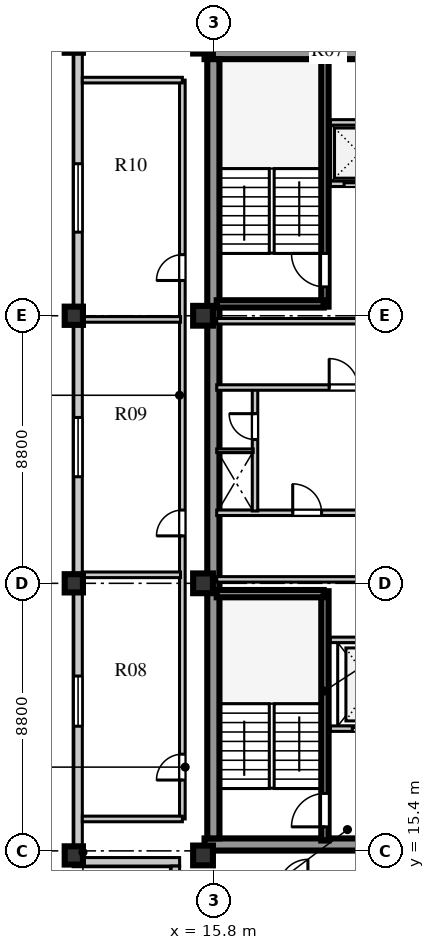
"""IFC4 building model, lengths in metres.
Left out: names, types, materials, properties, quantities, classifications, styles, units other than length and angle.
Written with IfcOpenShell. Run it as: python <this file> out.ifc"""

import sys

from ifc_helpers import new_model, si_unit, direction, frame, frame_2d, origin, origin_2d, place, context, subcontext, project, spatial, rectangle, extrude, element, fill, save


model = new_model("IFC4")
c1 = context("Model", 3, precision=1e-05, world=origin(), true_north=direction((0.0, 1.0)))
c2 = subcontext(c1, "Body", "Model", "MODEL_VIEW")
j1 = project(units=[si_unit("LENGTHUNIT", "METRE"), si_unit("PLANEANGLEUNIT", "RADIAN")], contexts=[c1])
p1 = place(None, origin())
s1 = spatial("IfcSite", under=j1, at=p1, CompositionType="ELEMENT")
p2 = place(p1, origin())
s2 = spatial("IfcBuilding", under=s1, at=p2, CompositionType="ELEMENT")
p3 = place(p2, frame((0.0, 0.0, 342.9)))
s3 = spatial("IfcBuildingStorey", under=s2, at=p3, CompositionType="ELEMENT", Elevation=342.9)
for number, where, z_axis, x_axis in (
    (1, (15.5, 15.61, 0.0), (0.0, 0.0, 1.0), (1.0, 0.0, 0.0)),
    (2, (15.5, 41.64, 0.0), (0.0, 0.0, 1.0), (1.0, 0.0, 0.0)),
):
    element("IfcWall", number, at=place(p3, frame(where, z_axis=z_axis, x_axis=x_axis)), inside=s3, PredefinedType="SHEAR", context=c2, shape_type="SweptSolid", body=[
        extrude(rectangle(XDim=9.48, YDim=0.4, at=frame_2d((4.74, 0.0))), origin(), (0.0, 0.0, 1.0), 3.55),
    ])
p4 = place(p3, frame((15.79, 15.81, 0.0), z_axis=(0.0, 0.0, 1.0), x_axis=(0.0, 1.0, 0.0)))
e3 = element("IfcWall", 3, at=p4, inside=s3, PredefinedType="SHEAR", context=c2, shape_type="SweptSolid", body=[
    extrude(rectangle(XDim=25.63, YDim=0.4, at=frame_2d((12.815, 0.0))), origin(), (0.0, 0.0, 1.0), 3.55),
])
for number, where, z_axis, x_axis in (
    (4, (15.45, 15.25, 0.0), (0.0, 0.0, 1.0), (1.0, 0.0, 0.0)),
    (5, (15.45, 24.2, 0.0), (0.0, 0.0, 1.0), (1.0, 0.0, 0.0)),
    (6, (15.45, 33.0, 0.0), (0.0, 0.0, 1.0), (1.0, 0.0, 0.0)),
    (7, (15.45, 41.95, 0.0), (0.0, 0.0, 1.0), (1.0, 0.0, 0.0)),
):
    element("IfcColumn", number, at=place(p3, frame(where, z_axis=z_axis, x_axis=x_axis)), inside=s3, PredefinedType="COLUMN", context=c2, shape_type="SweptSolid", body=[
        extrude(rectangle(XDim=0.65, YDim=0.65, at=origin_2d()), origin(), (0.0, 0.0, 1.0), 3.55),
    ])
for number, where, z_axis, x_axis in (
    (8, (11.2, 15.25, 0.0), (0.0, 0.0, 1.0), (1.0, 0.0, 0.0)),
    (9, (11.2, 24.2, 0.0), (0.0, 0.0, 1.0), (1.0, 0.0, 0.0)),
    (10, (11.2, 33.0, 0.0), (0.0, 0.0, 1.0), (1.0, 0.0, 0.0)),
    (11, (11.2, 41.95, 0.0), (0.0, 0.0, 1.0), (1.0, 0.0, 0.0)),
):
    element("IfcColumn", number, at=place(p3, frame(where, z_axis=z_axis, x_axis=x_axis)), inside=s3, PredefinedType="COLUMN", context=c2, shape_type="SweptSolid", body=[
        extrude(rectangle(XDim=0.6, YDim=0.6, at=origin_2d()), origin(), (0.0, 0.0, 1.0), 3.55),
    ])
p5 = place(p3, frame((11.34, 42.02, 0.0), z_axis=(0.0, 0.0, 1.0), x_axis=(0.0, -1.0, 0.0)))
e12 = element("IfcWall", 12, at=p5, inside=s3, PredefinedType="STANDARD", context=c2, shape_type="SweptSolid", body=[
    extrude(rectangle(XDim=26.84, YDim=0.28, at=frame_2d((13.42, 0.0))), origin(), (0.0, 0.0, 1.0), 2.91),
])
p6 = place(p5, frame((20.87, 0.0, 0.8)))
e13 = element("IfcOpeningElement", 13, at=p6, cuts=e12, PredefinedType="OPENING", context=c2, shape_type="SweptSolid", body=[
    extrude(rectangle(XDim=1.65, YDim=1.95, at=frame_2d((0.825, 0.975))), frame((0.0, 0.15, 0.0), z_axis=(0.0, -1.0, 0.0), x_axis=(1.0, 0.0, 0.0)), (0.0, 0.0, 1.0), 0.3),
])
p7 = place(p5, frame((12.365, 0.0, 0.8)))
e14 = element("IfcOpeningElement", 14, at=p7, cuts=e12, PredefinedType="OPENING", context=c2, shape_type="SweptSolid", body=[
    extrude(rectangle(XDim=1.95, YDim=2.0, at=frame_2d((0.975, 1.0))), frame((0.0, 0.15, 0.0), z_axis=(0.0, -1.0, 0.0), x_axis=(1.0, 0.0, 0.0)), (0.0, 0.0, 1.0), 0.3),
])
p8 = place(p5, frame((4.02, 0.0, 0.8)))
e15 = element("IfcOpeningElement", 15, at=p8, cuts=e12, PredefinedType="OPENING", context=c2, shape_type="SweptSolid", body=[
    extrude(rectangle(XDim=2.25, YDim=2.0, at=frame_2d((1.125, 1.0))), frame((0.0, 0.15, 0.0), z_axis=(0.0, -1.0, 0.0), x_axis=(1.0, 0.0, 0.0)), (0.0, 0.0, 1.0), 0.3),
])
p9 = place(p3, frame((11.2, 15.04, 0.0), z_axis=(0.0, 0.0, 1.0), x_axis=(1.0, 0.0, 0.0)))
e16 = element("IfcWall", 16, at=p9, inside=s3, PredefinedType="STANDARD", context=c2, shape_type="SweptSolid", body=[
    extrude(rectangle(XDim=3.48, YDim=0.28, at=frame_2d((1.74, 0.0))), origin(), (0.0, 0.0, 1.0), 2.91),
])
p10 = place(p3, frame((14.54, 14.9, 0.0), z_axis=(0.0, 0.0, 1.0), x_axis=(0.0, -1.0, 0.0)))
e17 = element("IfcWall", 17, at=p10, inside=s3, PredefinedType="STANDARD", context=c2, shape_type="SweptSolid", body=[
    extrude(rectangle(XDim=2.92, YDim=0.28, at=frame_2d((1.46, 0.0))), origin(), (0.0, 0.0, 1.0), 2.91),
])
p11 = place(p3, frame((19.46, 15.74, 0.0), z_axis=(0.0, 0.0, 1.0), x_axis=(0.0, 1.0, 0.0)))
e18 = element("IfcWall", 18, at=p11, inside=s3, PredefinedType="SHEAR", context=c2, shape_type="SweptSolid", body=[
    extrude(rectangle(XDim=8.2, YDim=0.24, at=frame_2d((4.1, 0.0))), origin(), (0.0, 0.0, 1.0), 3.8),
])
p12 = place(p11, frame((0.45, 0.0, 0.0)))
e19 = element("IfcOpeningElement", 19, at=p12, cuts=e18, PredefinedType="OPENING", context=c2, shape_type="SweptSolid", body=[
    extrude(rectangle(XDim=1.1, YDim=2.1, at=frame_2d((0.55, 1.05))), frame((0.0, 0.13, 0.0), z_axis=(0.0, -1.0, 0.0), x_axis=(1.0, 0.0, 0.0)), (0.0, 0.0, 1.0), 0.26),
])
p13 = place(p3, frame((15.9, 23.86, 0.0), z_axis=(0.0, 0.0, 1.0), x_axis=(1.0, 0.0, 0.0)))
e20 = element("IfcWall", 20, at=p13, inside=s3, PredefinedType="SHEAR", context=c2, shape_type="SweptSolid", body=[
    extrude(rectangle(XDim=3.52, YDim=0.24, at=frame_2d((1.76, 0.0))), origin(), (0.0, 0.0, 1.0), 3.8),
])
p14 = place(p3, frame((19.64, 19.42, 0.0), z_axis=(0.0, 0.0, 1.0), x_axis=(1.0, 0.0, 0.0)))
e21 = element("IfcWall", 21, at=p14, inside=s3, PredefinedType="SOLIDWALL", context=c2, shape_type="SweptSolid", body=[
    extrude(rectangle(XDim=4.94, YDim=0.18, at=frame_2d((2.47, 0.0))), origin(), (0.0, 0.0, 1.0), 3.55),
])
p15 = place(p14, frame((0.72, 0.0, 0.0)))
e22 = element("IfcOpeningElement", 22, at=p15, cuts=e21, PredefinedType="OPENING", context=c2, shape_type="SweptSolid", body=[
    extrude(rectangle(XDim=1.1, YDim=2.1, at=frame_2d((0.55, 1.05))), frame((0.0, 0.1, 0.0), z_axis=(0.0, -1.0, 0.0), x_axis=(1.0, 0.0, 0.0)), (0.0, 0.0, 1.0), 0.2),
])
p16 = place(p14, frame((3.02, 0.0, 0.0)))
e23 = element("IfcOpeningElement", 23, at=p16, cuts=e21, PredefinedType="OPENING", context=c2, shape_type="SweptSolid", body=[
    extrude(rectangle(XDim=1.1, YDim=2.1, at=frame_2d((0.55, 1.05))), frame((0.0, 0.1, 0.0), z_axis=(0.0, -1.0, 0.0), x_axis=(1.0, 0.0, 0.0)), (0.0, 0.0, 1.0), 0.2),
])
p17 = place(p3, frame((19.64, 22.34, 0.0), z_axis=(0.0, 0.0, 1.0), x_axis=(1.0, 0.0, 0.0)))
e24 = element("IfcWall", 24, at=p17, inside=s3, PredefinedType="SOLIDWALL", context=c2, shape_type="SweptSolid", body=[
    extrude(rectangle(XDim=4.94, YDim=0.18, at=frame_2d((2.47, 0.0))), origin(), (0.0, 0.0, 1.0), 3.55),
])
p18 = place(p3, frame((15.9, 26.52, 0.0), z_axis=(0.0, 0.0, 1.0), x_axis=(1.0, 0.0, 0.0)))
e25 = element("IfcWall", 25, at=p18, inside=s3, PredefinedType="SOLIDWALL", context=c2, shape_type="SweptSolid", body=[
    extrude(rectangle(XDim=8.68, YDim=0.18, at=frame_2d((4.34, 0.0))), origin(), (0.0, 0.0, 1.0), 3.55),
])
p19 = place(p18, frame((2.5, 0.0, 0.0)))
e26 = element("IfcOpeningElement", 26, at=p19, cuts=e25, PredefinedType="OPENING", context=c2, shape_type="SweptSolid", body=[
    extrude(rectangle(XDim=0.95, YDim=2.1, at=frame_2d((0.475, 1.05))), frame((0.0, 0.1, 0.0), z_axis=(0.0, -1.0, 0.0), x_axis=(1.0, 0.0, 0.0)), (0.0, 0.0, 1.0), 0.2),
])
p20 = place(p18, frame((6.0, 0.0, 0.0)))
e27 = element("IfcOpeningElement", 27, at=p20, cuts=e25, PredefinedType="OPENING", context=c2, shape_type="SweptSolid", body=[
    extrude(rectangle(XDim=0.95, YDim=2.1, at=frame_2d((0.475, 1.05))), frame((0.0, 0.1, 0.0), z_axis=(0.0, -1.0, 0.0), x_axis=(1.0, 0.0, 0.0)), (0.0, 0.0, 1.0), 0.2),
])
p21 = place(p3, frame((15.9, 24.33, 0.0), z_axis=(0.0, 0.0, 1.0), x_axis=(1.0, 0.0, 0.0)))
e28 = element("IfcWall", 28, at=p21, inside=s3, PredefinedType="SOLIDWALL", context=c2, shape_type="SweptSolid", body=[
    extrude(rectangle(XDim=8.68, YDim=0.18, at=frame_2d((4.34, 0.0))), origin(), (0.0, 0.0, 1.0), 2.95),
])
p22 = place(p3, frame((17.16, 26.58, 0.0), z_axis=(0.0, 0.0, 1.0), x_axis=(0.0, 1.0, 0.0)))
e29 = element("IfcWall", 29, at=p22, inside=s3, PredefinedType="SOLIDWALL", context=c2, shape_type="SweptSolid", body=[
    extrude(rectangle(XDim=4.02, YDim=0.18, at=frame_2d((2.01, 0.0))), origin(), (0.0, 0.0, 1.0), 3.55),
])
p23 = place(p22, frame((2.35, 0.0, 0.0)))
e30 = element("IfcOpeningElement", 30, at=p23, cuts=e29, PredefinedType="OPENING", context=c2, shape_type="SweptSolid", body=[
    extrude(rectangle(XDim=0.85, YDim=2.06, at=frame_2d((0.425, 1.03))), frame((0.0, 0.1, 0.0), z_axis=(0.0, -1.0, 0.0), x_axis=(1.0, 0.0, 0.0)), (0.0, 0.0, 1.0), 0.2),
])
p24 = place(p3, frame((15.9, 28.56, 0.0), z_axis=(0.0, 0.0, 1.0), x_axis=(1.0, 0.0, 0.0)))
e31 = element("IfcWall", 31, at=p24, inside=s3, PredefinedType="PARTITIONING", context=c2, shape_type="SweptSolid", body=[
    extrude(rectangle(XDim=1.2, YDim=0.12, at=frame_2d((0.6, 0.0))), origin(), (0.0, 0.0, 1.0), 3.55),
])
p25 = place(p3, frame((15.9, 30.64, 0.0), z_axis=(0.0, 0.0, 1.0), x_axis=(1.0, 0.0, 0.0)))
e32 = element("IfcWall", 32, at=p25, inside=s3, PredefinedType="SOLIDWALL", context=c2, shape_type="SweptSolid", body=[
    extrude(rectangle(XDim=8.68, YDim=0.18, at=frame_2d((4.34, 0.0))), origin(), (0.0, 0.0, 1.0), 3.55),
])
p26 = place(p25, frame((3.7, 0.0, 0.0)))
e33 = element("IfcOpeningElement", 33, at=p26, cuts=e32, PredefinedType="OPENING", context=c2, shape_type="SweptSolid", body=[
    extrude(rectangle(XDim=0.95, YDim=2.1, at=frame_2d((0.475, 1.05))), frame((0.0, 0.1, 0.0), z_axis=(0.0, -1.0, 0.0), x_axis=(1.0, 0.0, 0.0)), (0.0, 0.0, 1.0), 0.2),
])
p27 = place(p3, frame((15.9, 32.82, 0.0), z_axis=(0.0, 0.0, 1.0), x_axis=(1.0, 0.0, 0.0)))
e34 = element("IfcWall", 34, at=p27, inside=s3, PredefinedType="SOLIDWALL", context=c2, shape_type="SweptSolid", body=[
    extrude(rectangle(XDim=8.68, YDim=0.18, at=frame_2d((4.34, 0.0))), origin(), (0.0, 0.0, 1.0), 2.95),
])
p28 = place(p3, frame((19.46, 33.3, 0.0), z_axis=(0.0, 0.0, 1.0), x_axis=(0.0, 1.0, 0.0)))
e35 = element("IfcWall", 35, at=p28, inside=s3, PredefinedType="SHEAR", context=c2, shape_type="SweptSolid", body=[
    extrude(rectangle(XDim=8.18, YDim=0.24, at=frame_2d((4.09, 0.0))), origin(), (0.0, 0.0, 1.0), 3.8),
])
p29 = place(p28, frame((0.65, 0.0, 0.0)))
e36 = element("IfcOpeningElement", 36, at=p29, cuts=e35, PredefinedType="OPENING", context=c2, shape_type="SweptSolid", body=[
    extrude(rectangle(XDim=1.1, YDim=2.1, at=frame_2d((0.55, 1.05))), frame((0.0, 0.13, 0.0), z_axis=(0.0, -1.0, 0.0), x_axis=(1.0, 0.0, 0.0)), (0.0, 0.0, 1.0), 0.26),
])
p30 = place(p3, frame((15.9, 33.39, 0.0), z_axis=(0.0, 0.0, 1.0), x_axis=(1.0, 0.0, 0.0)))
e37 = element("IfcWall", 37, at=p30, inside=s3, PredefinedType="SHEAR", context=c2, shape_type="SweptSolid", body=[
    extrude(rectangle(XDim=3.52, YDim=0.24, at=frame_2d((1.76, 0.0))), origin(), (0.0, 0.0, 1.0), 3.8),
])
p31 = place(p3, frame((19.64, 37.34, 0.0), z_axis=(0.0, 0.0, 1.0), x_axis=(1.0, 0.0, 0.0)))
e38 = element("IfcWall", 38, at=p31, inside=s3, PredefinedType="SOLIDWALL", context=c2, shape_type="SweptSolid", body=[
    extrude(rectangle(XDim=4.94, YDim=0.18, at=frame_2d((2.47, 0.0))), origin(), (0.0, 0.0, 1.0), 3.55),
])
p32 = place(p31, frame((0.45, 0.0, 0.0)))
e39 = element("IfcOpeningElement", 39, at=p32, cuts=e38, PredefinedType="OPENING", context=c2, shape_type="SweptSolid", body=[
    extrude(rectangle(XDim=1.0, YDim=2.1, at=frame_2d((0.5, 1.05))), frame((0.0, 0.1, 0.0), z_axis=(0.0, -1.0, 0.0), x_axis=(1.0, 0.0, 0.0)), (0.0, 0.0, 1.0), 0.2),
])
p33 = place(p31, frame((2.5, 0.0, 0.0)))
e40 = element("IfcOpeningElement", 40, at=p33, cuts=e38, PredefinedType="OPENING", context=c2, shape_type="SweptSolid", body=[
    extrude(rectangle(XDim=1.0, YDim=2.1, at=frame_2d((0.5, 1.05))), frame((0.0, 0.1, 0.0), z_axis=(0.0, -1.0, 0.0), x_axis=(1.0, 0.0, 0.0)), (0.0, 0.0, 1.0), 0.2),
])
p34 = place(p3, frame((19.64, 39.36, 0.0), z_axis=(0.0, 0.0, 1.0), x_axis=(1.0, 0.0, 0.0)))
e41 = element("IfcWall", 41, at=p34, inside=s3, PredefinedType="SOLIDWALL", context=c2, shape_type="SweptSolid", body=[
    extrude(rectangle(XDim=4.94, YDim=0.18, at=frame_2d((2.47, 0.0))), origin(), (0.0, 0.0, 1.0), 3.55),
])
p35 = place(p3, frame((14.77, 16.45, 0.0), z_axis=(0.0, 0.0, 1.0), x_axis=(0.0, 1.0, 0.0)))
e42 = element("IfcWall", 42, at=p35, inside=s3, PredefinedType="SOLIDWALL", context=c2, shape_type="SweptSolid", body=[
    extrude(rectangle(XDim=24.3, YDim=0.185, at=frame_2d((12.15, 0.0))), origin(), (0.0, 0.0, 1.0), 3.55),
])
p36 = place(p35, frame((1.28, 0.0, 0.0)))
e43 = element("IfcOpeningElement", 43, at=p36, cuts=e42, PredefinedType="OPENING", context=c2, shape_type="SweptSolid", body=[
    extrude(rectangle(XDim=0.85, YDim=2.08, at=frame_2d((0.425, 1.04))), frame((0.0, 0.103, 0.0), z_axis=(0.0, -1.0, 0.0), x_axis=(1.0, 0.0, 0.0)), (0.0, 0.0, 1.0), 0.205),
])
p37 = place(p35, frame((9.31, 0.0, 0.0)))
e44 = element("IfcOpeningElement", 44, at=p37, cuts=e42, PredefinedType="OPENING", context=c2, shape_type="SweptSolid", body=[
    extrude(rectangle(XDim=0.85, YDim=2.08, at=frame_2d((0.425, 1.04))), frame((0.0, 0.103, 0.0), z_axis=(0.0, -1.0, 0.0), x_axis=(1.0, 0.0, 0.0)), (0.0, 0.0, 1.0), 0.205),
])
p38 = place(p35, frame((17.71, 0.0, 0.0)))
e45 = element("IfcOpeningElement", 45, at=p38, cuts=e42, PredefinedType="OPENING", context=c2, shape_type="SweptSolid", body=[
    extrude(rectangle(XDim=0.85, YDim=2.08, at=frame_2d((0.425, 1.04))), frame((0.0, 0.103, 0.0), z_axis=(0.0, -1.0, 0.0), x_axis=(1.0, 0.0, 0.0)), (0.0, 0.0, 1.0), 0.205),
])
for number, where, z_axis, x_axis in (
    (46, (11.48, 16.45, 0.0), (0.0, 0.0, 1.0), (1.0, 0.0, 0.0)),
    (47, (11.48, 40.75, 0.0), (0.0, 0.0, 1.0), (1.0, 0.0, 0.0)),
):
    element("IfcWall", number, at=place(p3, frame(where, z_axis=z_axis, x_axis=x_axis)), inside=s3, PredefinedType="SOLIDWALL", context=c2, shape_type="SweptSolid", body=[
        extrude(rectangle(XDim=3.29, YDim=0.185, at=frame_2d((1.645, 0.0))), origin(), (0.0, 0.0, 1.0), 3.55),
    ])
for number, where, z_axis, x_axis in (
    (48, (11.48, 24.48, 0.0), (0.0, 0.0, 1.0), (1.0, 0.0, 0.0)),
    (49, (11.48, 32.88, 0.0), (0.0, 0.0, 1.0), (1.0, 0.0, 0.0)),
):
    element("IfcWall", number, at=place(p3, frame(where, z_axis=z_axis, x_axis=x_axis)), inside=s3, PredefinedType="SOLIDWALL", context=c2, shape_type="SweptSolid", body=[
        extrude(rectangle(XDim=3.23, YDim=0.185, at=frame_2d((1.615, 0.0))), origin(), (0.0, 0.0, 1.0), 3.1),
    ])
p39 = place(p6, origin())
e50 = element("IfcWindow", 50, at=p39, inside=s3, PartitioningType="SINGLE_PANEL", PredefinedType="WINDOW", context=c2, shape_type="SweptSolid", body=[
    extrude(rectangle(XDim=1.65, YDim=1.95, at=frame_2d((0.825, 0.975))), frame((0.0, 0.03, 0.0), z_axis=(0.0, -1.0, 0.0), x_axis=(1.0, 0.0, 0.0)), (0.0, 0.0, 1.0), 0.06),
])
fill(e13, e50)
p40 = place(p7, origin())
e51 = element("IfcWindow", 51, at=p40, inside=s3, PartitioningType="SINGLE_PANEL", PredefinedType="WINDOW", context=c2, shape_type="SweptSolid", body=[
    extrude(rectangle(XDim=1.95, YDim=2.0, at=frame_2d((0.975, 1.0))), frame((0.0, 0.03, 0.0), z_axis=(0.0, -1.0, 0.0), x_axis=(1.0, 0.0, 0.0)), (0.0, 0.0, 1.0), 0.06),
])
fill(e14, e51)
p41 = place(p8, origin())
e52 = element("IfcWindow", 52, at=p41, inside=s3, PartitioningType="SINGLE_PANEL", PredefinedType="WINDOW", context=c2, shape_type="SweptSolid", body=[
    extrude(rectangle(XDim=2.25, YDim=2.0, at=frame_2d((1.125, 1.0))), frame((0.0, 0.03, 0.0), z_axis=(0.0, -1.0, 0.0), x_axis=(1.0, 0.0, 0.0)), (0.0, 0.0, 1.0), 0.06),
])
fill(e15, e52)
p42 = place(p12, origin())
e53 = element("IfcDoor", 53, at=p42, inside=s3, OperationType="SINGLE_SWING_LEFT", PredefinedType="DOOR", context=c2, shape_type="SweptSolid", body=[
    extrude(rectangle(XDim=1.1, YDim=2.1, at=frame_2d((0.55, 1.05))), frame((0.0, 0.025, 0.0), z_axis=(0.0, -1.0, 0.0), x_axis=(1.0, 0.0, 0.0)), (0.0, 0.0, 1.0), 0.05),
])
fill(e19, e53)
p43 = place(p15, origin())
e54 = element("IfcDoor", 54, at=p43, inside=s3, OperationType="DOUBLE_DOOR_SLIDING", PredefinedType="DOOR", context=c2, shape_type="SweptSolid", body=[
    extrude(rectangle(XDim=1.1, YDim=2.1, at=frame_2d((0.55, 1.05))), frame((0.0, 0.025, 0.0), z_axis=(0.0, -1.0, 0.0), x_axis=(1.0, 0.0, 0.0)), (0.0, 0.0, 1.0), 0.05),
])
fill(e22, e54)
p44 = place(p19, origin())
e55 = element("IfcDoor", 55, at=p44, inside=s3, OperationType="SINGLE_SWING_LEFT", PredefinedType="DOOR", context=c2, shape_type="SweptSolid", body=[
    extrude(rectangle(XDim=0.95, YDim=2.1, at=frame_2d((0.475, 1.05))), frame((0.0, 0.025, 0.0), z_axis=(0.0, -1.0, 0.0), x_axis=(1.0, 0.0, 0.0)), (0.0, 0.0, 1.0), 0.05),
])
fill(e26, e55)
p45 = place(p23, origin())
e56 = element("IfcDoor", 56, at=p45, inside=s3, OperationType="SINGLE_SWING_RIGHT", PredefinedType="DOOR", context=c2, shape_type="SweptSolid", body=[
    extrude(rectangle(XDim=0.85, YDim=2.06, at=frame_2d((0.425, 1.03))), frame((0.0, 0.025, 0.0), z_axis=(0.0, -1.0, 0.0), x_axis=(1.0, 0.0, 0.0)), (0.0, 0.0, 1.0), 0.05),
])
fill(e30, e56)
p46 = place(p26, frame((0.95, 0.0, 0.0), z_axis=(0.0, 0.0, 1.0), x_axis=(-1.0, 0.0, 0.0)))
e57 = element("IfcDoor", 57, at=p46, inside=s3, OperationType="SINGLE_SWING_RIGHT", PredefinedType="DOOR", context=c2, shape_type="SweptSolid", body=[
    extrude(rectangle(XDim=0.95, YDim=2.1, at=frame_2d((0.475, 1.05))), frame((0.0, 0.025, 0.0), z_axis=(0.0, -1.0, 0.0), x_axis=(1.0, 0.0, 0.0)), (0.0, 0.0, 1.0), 0.05),
])
fill(e33, e57)
p47 = place(p29, origin())
e58 = element("IfcDoor", 58, at=p47, inside=s3, OperationType="SINGLE_SWING_RIGHT", PredefinedType="DOOR", context=c2, shape_type="SweptSolid", body=[
    extrude(rectangle(XDim=1.1, YDim=2.1, at=frame_2d((0.55, 1.05))), frame((0.0, 0.025, 0.0), z_axis=(0.0, -1.0, 0.0), x_axis=(1.0, 0.0, 0.0)), (0.0, 0.0, 1.0), 0.05),
])
fill(e36, e58)
p48 = place(p32, frame((1.0, 0.0, 0.0), z_axis=(0.0, 0.0, 1.0), x_axis=(-1.0, 0.0, 0.0)))
e59 = element("IfcDoor", 59, at=p48, inside=s3, OperationType="DOUBLE_DOOR_SLIDING", PredefinedType="DOOR", context=c2, shape_type="SweptSolid", body=[
    extrude(rectangle(XDim=1.0, YDim=2.1, at=frame_2d((0.5, 1.05))), frame((0.0, 0.025, 0.0), z_axis=(0.0, -1.0, 0.0), x_axis=(1.0, 0.0, 0.0)), (0.0, 0.0, 1.0), 0.05),
])
fill(e39, e59)
p49 = place(p36, origin())
e60 = element("IfcDoor", 60, at=p49, inside=s3, OperationType="SINGLE_SWING_LEFT", PredefinedType="DOOR", context=c2, shape_type="SweptSolid", body=[
    extrude(rectangle(XDim=0.85, YDim=2.08, at=frame_2d((0.425, 1.04))), frame((0.0, 0.025, 0.0), z_axis=(0.0, -1.0, 0.0), x_axis=(1.0, 0.0, 0.0)), (0.0, 0.0, 1.0), 0.05),
])
fill(e43, e60)
p50 = place(p37, origin())
e61 = element("IfcDoor", 61, at=p50, inside=s3, OperationType="SINGLE_SWING_LEFT", PredefinedType="DOOR", context=c2, shape_type="SweptSolid", body=[
    extrude(rectangle(XDim=0.85, YDim=2.08, at=frame_2d((0.425, 1.04))), frame((0.0, 0.025, 0.0), z_axis=(0.0, -1.0, 0.0), x_axis=(1.0, 0.0, 0.0)), (0.0, 0.0, 1.0), 0.05),
])
fill(e44, e61)
p51 = place(p38, origin())
e62 = element("IfcDoor", 62, at=p51, inside=s3, OperationType="SINGLE_SWING_LEFT", PredefinedType="DOOR", context=c2, shape_type="SweptSolid", body=[
    extrude(rectangle(XDim=0.85, YDim=2.08, at=frame_2d((0.425, 1.04))), frame((0.0, 0.025, 0.0), z_axis=(0.0, -1.0, 0.0), x_axis=(1.0, 0.0, 0.0)), (0.0, 0.0, 1.0), 0.05),
])
fill(e45, e62)
save(model, sys.argv[1])
